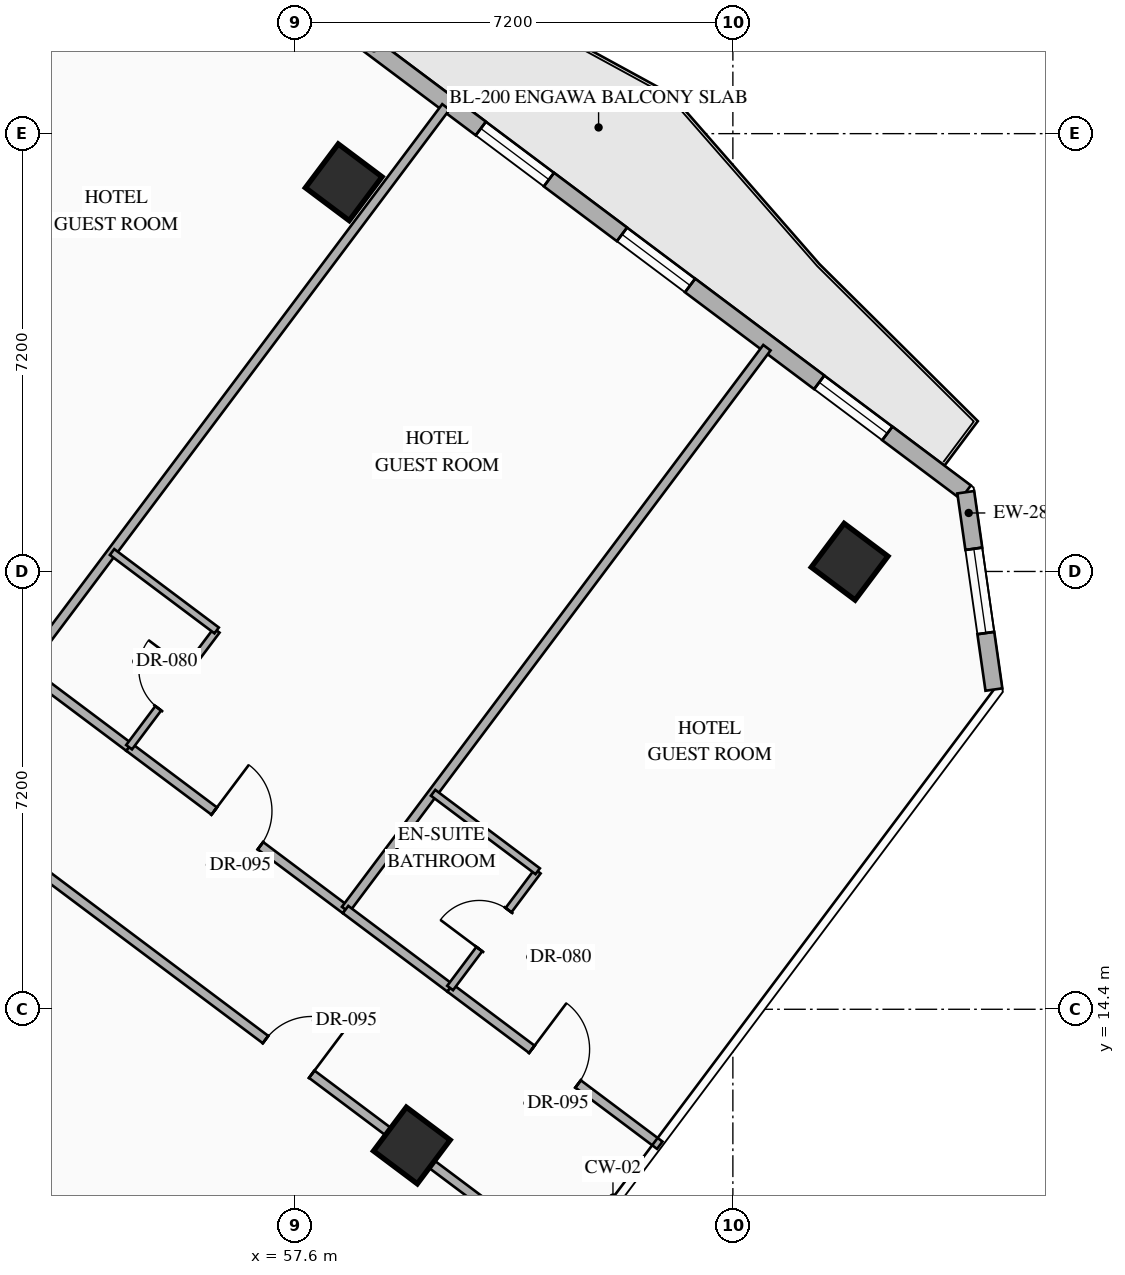
"""IFC4 building model, lengths in metres.
Left out: names, types, materials, properties, quantities, classifications, styles, units other than length and angle.
Written with IfcOpenShell. Run it as: python <this file> out.ifc"""

import sys

from ifc_helpers import new_model, si_unit, direction, frame, frame_2d, origin, origin_2d, place, context, subcontext, project, spatial, rectangle, hollow_rectangle, extrude, element, fill, save


model = new_model("IFC4")
c1 = context("Model", 3, precision=1e-05, world=origin(), true_north=direction((0.0, 1.0)))
c2 = subcontext(c1, "Body", "Model", "MODEL_VIEW")
j1 = project(units=[si_unit("LENGTHUNIT", "METRE"), si_unit("PLANEANGLEUNIT", "RADIAN")], contexts=[c1])
p1 = place(None, origin())
s1 = spatial("IfcSite", under=j1, at=p1, CompositionType="ELEMENT")
p2 = place(p1, origin())
s2 = spatial("IfcBuilding", under=s1, at=p2, CompositionType="ELEMENT")
p3 = place(p2, frame((0.0, 0.0, 77.95)))
s3 = spatial("IfcBuildingStorey", under=s2, at=p3, CompositionType="ELEMENT", Elevation=77.95)
for number, where, z_axis, x_axis in (
    (1, (58.4, 28.0, 0.0), (0.0, 0.0, 1.0), (0.8, -0.6, 0.0)),
    (2, (66.72, 21.76, 0.0), (0.0, 0.0, 1.0), (0.8, -0.6, 0.0)),
    (3, (59.52, 12.16, 0.0), (0.0, 0.0, 1.0), (0.8, -0.6, 0.0)),
):
    element("IfcColumn", number, at=place(p3, frame(where, z_axis=z_axis, x_axis=x_axis)), inside=s3, PredefinedType="COLUMN", context=c2, shape_type="SweptSolid", body=[
        extrude(hollow_rectangle(XDim=0.9, YDim=0.9, WallThickness=0.036, at=origin_2d()), origin(), (0.0, 0.0, 1.0), 3.35),
    ])
p4 = place(p3, frame((44.86, 40.73, 0.0), z_axis=(0.0, 0.0, 1.0), x_axis=(0.800006902154, -0.599990797017, 0.0)))
e4 = element("IfcWall", 4, at=p4, inside=s3, PredefinedType="STANDARD", context=c2, shape_type="SweptSolid", body=[
    extrude(rectangle(XDim=29.712, YDim=0.28, at=frame_2d((14.856, 0.0))), origin(), (0.0, 0.0, 1.0), 3.13),
])
p5 = place(p4, frame((14.249, 0.0, 0.0)))
e5 = element("IfcOpeningElement", 5, at=p5, cuts=e4, PredefinedType="OPENING", context=c2, shape_type="SweptSolid", body=[
    extrude(rectangle(XDim=1.1, YDim=2.2, at=frame_2d((0.55, 1.1))), frame((0.0, 0.15, 0.0), z_axis=(0.0, -1.0, 0.0), x_axis=(1.0, 0.0, 0.0)), (0.0, 0.0, 1.0), 0.3),
])
p6 = place(p4, frame((1.612, 0.0, 0.85)))
e6 = element("IfcOpeningElement", 6, at=p6, cuts=e4, PredefinedType="OPENING", context=c2, shape_type="SweptSolid", body=[
    extrude(rectangle(XDim=1.4, YDim=1.8, at=frame_2d((0.7, 0.9))), frame((0.0, 0.15, 0.0), z_axis=(0.0, -1.0, 0.0), x_axis=(1.0, 0.0, 0.0)), (0.0, 0.0, 1.0), 0.3),
])
p7 = place(p4, frame((5.667, 0.0, 0.85)))
e7 = element("IfcOpeningElement", 7, at=p7, cuts=e4, PredefinedType="OPENING", context=c2, shape_type="SweptSolid", body=[
    extrude(rectangle(XDim=1.4, YDim=1.8, at=frame_2d((0.7, 0.9))), frame((0.0, 0.15, 0.0), z_axis=(0.0, -1.0, 0.0), x_axis=(1.0, 0.0, 0.0)), (0.0, 0.0, 1.0), 0.3),
])
p8 = place(p4, frame((9.912, 0.0, 0.85)))
e8 = element("IfcOpeningElement", 8, at=p8, cuts=e4, PredefinedType="OPENING", context=c2, shape_type="SweptSolid", body=[
    extrude(rectangle(XDim=1.4, YDim=1.8, at=frame_2d((0.7, 0.9))), frame((0.0, 0.15, 0.0), z_axis=(0.0, -1.0, 0.0), x_axis=(1.0, 0.0, 0.0)), (0.0, 0.0, 1.0), 0.3),
])
p9 = place(p4, frame((19.743, 0.0, 0.85)))
e9 = element("IfcOpeningElement", 9, at=p9, cuts=e4, PredefinedType="OPENING", context=c2, shape_type="SweptSolid", body=[
    extrude(rectangle(XDim=1.4, YDim=1.8, at=frame_2d((0.7, 0.9))), frame((0.0, 0.15, 0.0), z_axis=(0.0, -1.0, 0.0), x_axis=(1.0, 0.0, 0.0)), (0.0, 0.0, 1.0), 0.3),
])
p10 = place(p4, frame((22.645, 0.0, 0.85)))
e10 = element("IfcOpeningElement", 10, at=p10, cuts=e4, PredefinedType="OPENING", context=c2, shape_type="SweptSolid", body=[
    extrude(rectangle(XDim=1.4, YDim=1.8, at=frame_2d((0.7, 0.9))), frame((0.0, 0.15, 0.0), z_axis=(0.0, -1.0, 0.0), x_axis=(1.0, 0.0, 0.0)), (0.0, 0.0, 1.0), 0.3),
])
p11 = place(p4, frame((26.7, 0.0, 0.85)))
e11 = element("IfcOpeningElement", 11, at=p11, cuts=e4, PredefinedType="OPENING", context=c2, shape_type="SweptSolid", body=[
    extrude(rectangle(XDim=1.4, YDim=1.8, at=frame_2d((0.7, 0.9))), frame((0.0, 0.15, 0.0), z_axis=(0.0, -1.0, 0.0), x_axis=(1.0, 0.0, 0.0)), (0.0, 0.0, 1.0), 0.3),
])
p12 = place(p3, frame((68.63, 22.903, 0.0), z_axis=(0.0, 0.0, 1.0), x_axis=(0.141285803956, -0.989968848803, 0.0)))
e12 = element("IfcWall", 12, at=p12, inside=s3, PredefinedType="STANDARD", context=c2, shape_type="SweptSolid", body=[
    extrude(rectangle(XDim=3.278, YDim=0.28, at=frame_2d((1.639, 0.0))), origin(), (0.0, 0.0, 1.0), 3.13),
])
p13 = place(p12, frame((0.939, 0.0, 0.85)))
e13 = element("IfcOpeningElement", 13, at=p13, cuts=e12, PredefinedType="OPENING", context=c2, shape_type="SweptSolid", body=[
    extrude(rectangle(XDim=1.4, YDim=1.8, at=frame_2d((0.7, 0.9))), frame((0.0, 0.15, 0.0), z_axis=(0.0, -1.0, 0.0), x_axis=(1.0, 0.0, 0.0)), (0.0, 0.0, 1.0), 0.3),
])
for number, where, z_axis, x_axis in (
    (14, (47.87, 23.96, 0.0), (0.0, 0.0, 1.0), (0.6, 0.8, 0.0)),
    (15, (53.15, 20.0, 0.0), (0.0, 0.0, 1.0), (0.6, 0.8, 0.0)),
):
    element("IfcWall", number, at=place(p3, frame(where, z_axis=z_axis, x_axis=x_axis)), inside=s3, PredefinedType="PARTITIONING", context=c2, shape_type="SweptSolid", body=[
        extrude(rectangle(XDim=11.55, YDim=0.15, at=frame_2d((5.775, 0.0))), origin(), (0.0, 0.0, 1.0), 3.13),
    ])
p14 = place(p3, frame((53.15, 20.0, 0.0), z_axis=(0.0, 0.0, 1.0), x_axis=(0.800027249606, -0.599963665473, 0.0)))
e16 = element("IfcWall", 16, at=p14, inside=s3, PredefinedType="PARTITIONING", context=c2, shape_type="SweptSolid", body=[
    extrude(rectangle(XDim=2.15, YDim=0.15, at=frame_2d((1.075, 0.0))), origin(), (0.0, 0.0, 1.0), 2.775),
])
p15 = place(p3, frame((54.87, 18.71, 0.0), z_axis=(0.0, 0.0, 1.0), x_axis=(0.799993416095, -0.600008778439, 0.0)))
e17 = element("IfcWall", 17, at=p15, inside=s3, PredefinedType="PARTITIONING", context=c2, shape_type="SweptSolid", body=[
    extrude(rectangle(XDim=4.45, YDim=0.15, at=frame_2d((2.225, 0.0))), origin(), (0.0, 0.0, 1.0), 2.775),
])
p16 = place(p15, frame((1.75, 0.0, 0.0)))
e18 = element("IfcOpeningElement", 18, at=p16, cuts=e17, PredefinedType="OPENING", context=c2, shape_type="SweptSolid", body=[
    extrude(rectangle(XDim=0.95, YDim=2.15, at=frame_2d((0.475, 1.075))), frame((0.0, 0.085, 0.0), z_axis=(0.0, -1.0, 0.0), x_axis=(1.0, 0.0, 0.0)), (0.0, 0.0, 1.0), 0.17),
])
p17 = place(p3, frame((54.87, 18.71, 0.0), z_axis=(0.0, 0.0, 1.0), x_axis=(0.6, 0.8, 0.0)))
e19 = element("IfcWall", 19, at=p17, inside=s3, PredefinedType="PARTITIONING", context=c2, shape_type="SweptSolid", body=[
    extrude(rectangle(XDim=2.4, YDim=0.12, at=frame_2d((1.2, 0.0))), origin(), (0.0, 0.0, 1.0), 3.13),
])
p18 = place(p17, frame((0.8, 0.0, 0.0)))
e20 = element("IfcOpeningElement", 20, at=p18, cuts=e19, PredefinedType="OPENING", context=c2, shape_type="SweptSolid", body=[
    extrude(rectangle(XDim=0.8, YDim=2.06, at=frame_2d((0.4, 1.03))), frame((0.0, 0.07, 0.0), z_axis=(0.0, -1.0, 0.0), x_axis=(1.0, 0.0, 0.0)), (0.0, 0.0, 1.0), 0.14),
])
p19 = place(p3, frame((54.59, 21.92, 0.0), z_axis=(0.0, 0.0, 1.0), x_axis=(0.79998637334, -0.60001816845, 0.0)))
e21 = element("IfcWall", 21, at=p19, inside=s3, PredefinedType="PARTITIONING", context=c2, shape_type="SweptSolid", body=[
    extrude(rectangle(XDim=2.15, YDim=0.12, at=frame_2d((1.075, 0.0))), origin(), (0.0, 0.0, 1.0), 3.13),
])
p20 = place(p3, frame((58.43, 16.04, 0.0), z_axis=(0.0, 0.0, 1.0), x_axis=(0.60001014597, 0.799992390422, 0.0)))
e22 = element("IfcWall", 22, at=p20, inside=s3, PredefinedType="PARTITIONING", context=c2, shape_type="SweptSolid", body=[
    extrude(rectangle(XDim=11.55, YDim=0.15, at=frame_2d((5.775, 0.0))), origin(), (0.0, 0.0, 1.0), 3.13),
])
p21 = place(p3, frame((58.43, 16.04, 0.0), z_axis=(0.0, 0.0, 1.0), x_axis=(0.79998637334, -0.60001816845, 0.0)))
e23 = element("IfcWall", 23, at=p21, inside=s3, PredefinedType="PARTITIONING", context=c2, shape_type="SweptSolid", body=[
    extrude(rectangle(XDim=2.15, YDim=0.15, at=frame_2d((1.075, 0.0))), origin(), (0.0, 0.0, 1.0), 2.775),
])
p22 = place(p3, frame((60.15, 14.75, 0.0), z_axis=(0.0, 0.0, 1.0), x_axis=(0.800006797429, -0.599990936654, 0.0)))
e24 = element("IfcWall", 24, at=p22, inside=s3, PredefinedType="PARTITIONING", context=c2, shape_type="SweptSolid", body=[
    extrude(rectangle(XDim=4.31, YDim=0.15, at=frame_2d((2.155, 0.0))), origin(), (0.0, 0.0, 1.0), 2.775),
])
p23 = place(p22, frame((1.68, 0.0, 0.0)))
e25 = element("IfcOpeningElement", 25, at=p23, cuts=e24, PredefinedType="OPENING", context=c2, shape_type="SweptSolid", body=[
    extrude(rectangle(XDim=0.95, YDim=2.15, at=frame_2d((0.475, 1.075))), frame((0.0, 0.085, 0.0), z_axis=(0.0, -1.0, 0.0), x_axis=(1.0, 0.0, 0.0)), (0.0, 0.0, 1.0), 0.17),
])
p24 = place(p3, frame((60.15, 14.75, 0.0), z_axis=(0.0, 0.0, 1.0), x_axis=(0.600065100855, 0.79995117022, 0.0)))
e26 = element("IfcWall", 26, at=p24, inside=s3, PredefinedType="PARTITIONING", context=c2, shape_type="SweptSolid", body=[
    extrude(rectangle(XDim=2.4, YDim=0.12, at=frame_2d((1.2, 0.0))), origin(), (0.0, 0.0, 1.0), 3.13),
])
p25 = place(p24, frame((0.8, 0.0, 0.0)))
e27 = element("IfcOpeningElement", 27, at=p25, cuts=e26, PredefinedType="OPENING", context=c2, shape_type="SweptSolid", body=[
    extrude(rectangle(XDim=0.8, YDim=2.06, at=frame_2d((0.4, 1.03))), frame((0.0, 0.07, 0.0), z_axis=(0.0, -1.0, 0.0), x_axis=(1.0, 0.0, 0.0)), (0.0, 0.0, 1.0), 0.14),
])
p26 = place(p3, frame((59.87, 17.96, 0.0), z_axis=(0.0, 0.0, 1.0), x_axis=(0.79998637334, -0.60001816845, 0.0)))
e28 = element("IfcWall", 28, at=p26, inside=s3, PredefinedType="PARTITIONING", context=c2, shape_type="SweptSolid", body=[
    extrude(rectangle(XDim=2.15, YDim=0.12, at=frame_2d((1.075, 0.0))), origin(), (0.0, 0.0, 1.0), 3.13),
])
p27 = place(p3, frame((52.89, 17.07, 0.0), z_axis=(0.0, 0.0, 1.0), x_axis=(0.8, -0.6, 0.0)))
e29 = element("IfcWall", 29, at=p27, inside=s3, PredefinedType="PARTITIONING", context=c2, shape_type="SweptSolid", body=[
    extrude(rectangle(XDim=11.51, YDim=0.15, at=frame_2d((5.755, 0.0))), origin(), (0.0, 0.0, 1.0), 2.425),
])
p28 = place(p27, frame((5.28, 0.0, 0.0)))
e30 = element("IfcOpeningElement", 30, at=p28, cuts=e29, PredefinedType="OPENING", context=c2, shape_type="SweptSolid", body=[
    extrude(rectangle(XDim=0.95, YDim=2.15, at=frame_2d((0.475, 1.075))), frame((0.0, 0.085, 0.0), z_axis=(0.0, -1.0, 0.0), x_axis=(1.0, 0.0, 0.0)), (0.0, 0.0, 1.0), 0.17),
])
p29 = place(p9, origin())
e31 = element("IfcWindow", 31, at=p29, inside=s3, PartitioningType="SINGLE_PANEL", PredefinedType="WINDOW", context=c2, shape_type="SweptSolid", body=[
    extrude(rectangle(XDim=1.4, YDim=1.8, at=frame_2d((0.7, 0.9))), frame((0.0, 0.03, 0.0), z_axis=(0.0, -1.0, 0.0), x_axis=(1.0, 0.0, 0.0)), (0.0, 0.0, 1.0), 0.06),
])
fill(e9, e31)
p30 = place(p10, origin())
e32 = element("IfcWindow", 32, at=p30, inside=s3, PartitioningType="SINGLE_PANEL", PredefinedType="WINDOW", context=c2, shape_type="SweptSolid", body=[
    extrude(rectangle(XDim=1.4, YDim=1.8, at=frame_2d((0.7, 0.9))), frame((0.0, 0.03, 0.0), z_axis=(0.0, -1.0, 0.0), x_axis=(1.0, 0.0, 0.0)), (0.0, 0.0, 1.0), 0.06),
])
fill(e10, e32)
p31 = place(p11, origin())
e33 = element("IfcWindow", 33, at=p31, inside=s3, PartitioningType="SINGLE_PANEL", PredefinedType="WINDOW", context=c2, shape_type="SweptSolid", body=[
    extrude(rectangle(XDim=1.4, YDim=1.8, at=frame_2d((0.7, 0.9))), frame((0.0, 0.03, 0.0), z_axis=(0.0, -1.0, 0.0), x_axis=(1.0, 0.0, 0.0)), (0.0, 0.0, 1.0), 0.06),
])
fill(e11, e33)
p32 = place(p13, origin())
e34 = element("IfcWindow", 34, at=p32, inside=s3, PartitioningType="SINGLE_PANEL", PredefinedType="WINDOW", context=c2, shape_type="SweptSolid", body=[
    extrude(rectangle(XDim=1.4, YDim=1.8, at=frame_2d((0.7, 0.9))), frame((0.0, 0.03, 0.0), z_axis=(0.0, -1.0, 0.0), x_axis=(1.0, 0.0, 0.0)), (0.0, 0.0, 1.0), 0.06),
])
fill(e13, e34)
p33 = place(p16, origin())
e35 = element("IfcDoor", 35, at=p33, inside=s3, OperationType="SINGLE_SWING_LEFT", PredefinedType="DOOR", context=c2, shape_type="SweptSolid", body=[
    extrude(rectangle(XDim=0.95, YDim=2.15, at=frame_2d((0.475, 1.075))), frame((0.0, 0.025, 0.0), z_axis=(0.0, -1.0, 0.0), x_axis=(1.0, 0.0, 0.0)), (0.0, 0.0, 1.0), 0.05),
])
fill(e18, e35)
p34 = place(p18, origin())
e36 = element("IfcDoor", 36, at=p34, inside=s3, OperationType="SINGLE_SWING_RIGHT", PredefinedType="DOOR", context=c2, shape_type="SweptSolid", body=[
    extrude(rectangle(XDim=0.8, YDim=2.06, at=frame_2d((0.4, 1.03))), frame((0.0, 0.025, 0.0), z_axis=(0.0, -1.0, 0.0), x_axis=(1.0, 0.0, 0.0)), (0.0, 0.0, 1.0), 0.05),
])
fill(e20, e36)
p35 = place(p23, origin())
e37 = element("IfcDoor", 37, at=p35, inside=s3, OperationType="SINGLE_SWING_LEFT", PredefinedType="DOOR", context=c2, shape_type="SweptSolid", body=[
    extrude(rectangle(XDim=0.95, YDim=2.15, at=frame_2d((0.475, 1.075))), frame((0.0, 0.025, 0.0), z_axis=(0.0, -1.0, 0.0), x_axis=(1.0, 0.0, 0.0)), (0.0, 0.0, 1.0), 0.05),
])
fill(e25, e37)
p36 = place(p25, origin())
e38 = element("IfcDoor", 38, at=p36, inside=s3, OperationType="SINGLE_SWING_LEFT", PredefinedType="DOOR", context=c2, shape_type="SweptSolid", body=[
    extrude(rectangle(XDim=0.8, YDim=2.06, at=frame_2d((0.4, 1.03))), frame((0.0, 0.025, 0.0), z_axis=(0.0, -1.0, 0.0), x_axis=(1.0, 0.0, 0.0)), (0.0, 0.0, 1.0), 0.05),
])
fill(e27, e38)
p37 = place(p28, origin())
e39 = element("IfcDoor", 39, at=p37, inside=s3, OperationType="SINGLE_SWING_RIGHT", PredefinedType="DOOR", context=c2, shape_type="SweptSolid", body=[
    extrude(rectangle(XDim=0.95, YDim=2.15, at=frame_2d((0.475, 1.075))), frame((0.0, 0.025, 0.0), z_axis=(0.0, -1.0, 0.0), x_axis=(1.0, 0.0, 0.0)), (0.0, 0.0, 1.0), 0.05),
])
fill(e30, e39)
save(model, sys.argv[1])
